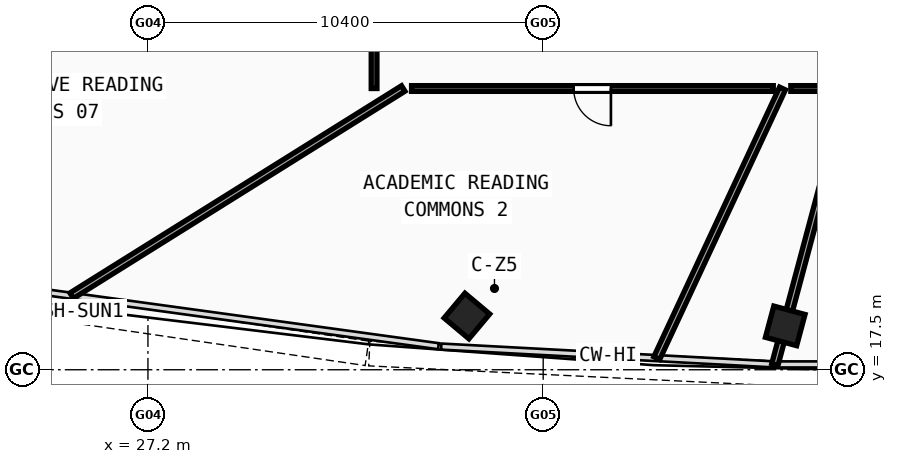
"""IFC4 building model, lengths in metres.
Left out: names, types, materials, properties, quantities, classifications, styles, units other than length and angle.
Written with IfcOpenShell. Run it as: python <this file> out.ifc"""

import sys

from ifc_helpers import new_model, si_unit, direction, frame, frame_2d, origin, origin_with_axes, origin_2d, place, context, subcontext, project, spatial, rectangle, hollow_rectangle, extrude, source, transform, mapped, element, fill, save


model = new_model("IFC4")
c1 = context("Model", 3, precision=1e-05, world=origin(), true_north=direction((0.0, 1.0)))
c2 = subcontext(c1, "Body", "Model", "MODEL_VIEW")
j1 = project(units=[si_unit("LENGTHUNIT", "METRE"), si_unit("PLANEANGLEUNIT", "RADIAN")], contexts=[c1])
p1 = place(None, origin())
s1 = spatial("IfcSite", under=j1, at=p1, CompositionType="ELEMENT")
p2 = place(p1, origin())
s2 = spatial("IfcBuilding", under=s1, at=p2, CompositionType="ELEMENT")
p3 = place(p2, frame((0.0, 0.0, 263.18)))
s3 = spatial("IfcBuildingStorey", under=s2, at=p3, CompositionType="ELEMENT", Elevation=263.18)
m1 = source(origin(), c2, "Body", "SweptSolid", [
    extrude(hollow_rectangle(XDim=0.85, YDim=0.85, WallThickness=0.034, at=origin_2d()), origin(), (0.0, 0.0, 1.0), 3.73),
])
for number, where, z_axis, x_axis in (
    (1, (35.593, 18.914, -0.26), (0.0, 0.0, 1.0), (0.766, -0.643, 0.0)),
    (2, (43.969, 18.654, -0.26), (0.0, 0.0, 1.0), (0.966, -0.259, 0.0)),
):
    element("IfcColumn", number, at=place(p3, frame(where, z_axis=z_axis, x_axis=x_axis)), inside=s3, PredefinedType="COLUMN", context=c2, shape_type="MappedRepresentation", body=[
        mapped(m1, transform((0.0, 0.0, 0.0), scale=1.0)),
    ])
p4 = place(p3, frame((33.917, 24.9, 0.0), z_axis=(0.0, 0.0, 1.0), x_axis=(-0.848046300914, -0.529922137211, 0.0)))
e3 = element("IfcWall", 3, at=p4, inside=s3, PredefinedType="PARTITIONING", context=c2, shape_type="SweptSolid", body=[
    extrude(rectangle(XDim=10.287, YDim=0.17, at=frame_2d((5.143, 0.0))), origin(), (0.0, 0.0, 1.0), 2.82),
])
p5 = place(p3, frame((43.896, 24.9, 0.0), z_axis=(0.0, 0.0, 1.0), x_axis=(-0.422631029952, -0.906301833012, 0.0)))
e4 = element("IfcWall", 4, at=p5, inside=s3, PredefinedType="PARTITIONING", context=c2, shape_type="SweptSolid", body=[
    extrude(rectangle(XDim=7.827, YDim=0.17, at=frame_2d((3.914, 0.0))), origin(), (0.0, 0.0, 1.0), 2.82),
])
p6 = place(p3, frame((45.642, 24.9, 0.0), z_axis=(0.0, 0.0, 1.0), x_axis=(-0.258810769147, -0.965928043787, 0.0)))
e5 = element("IfcWall", 5, at=p6, inside=s3, PredefinedType="PARTITIONING", context=c2, shape_type="SweptSolid", body=[
    extrude(rectangle(XDim=7.516, YDim=0.17, at=frame_2d((3.758, 0.0))), origin(), (0.0, 0.0, 1.0), 2.82),
])
p7 = place(p3, frame((33.15, 24.9, 0.0), z_axis=(0.0, 0.0, 1.0), x_axis=(0.0, 1.0, 0.0)))
e6 = element("IfcWall", 6, at=p7, inside=s3, PredefinedType="PARTITIONING", context=c2, shape_type="SweptSolid", body=[
    extrude(rectangle(XDim=5.958, YDim=0.15, at=frame_2d((2.979, 0.0))), origin(), (0.0, 0.0, 1.0), 3.12),
])
p8 = place(p7, frame((2.386, 0.0, 0.0)))
e7 = element("IfcOpeningElement", 7, at=p8, cuts=e6, PredefinedType="OPENING", context=c2, shape_type="SweptSolid", body=[
    extrude(rectangle(XDim=0.98, YDim=2.12, at=frame_2d((0.49, 1.06))), frame((0.0, 0.085, 0.0), z_axis=(0.0, -1.0, 0.0), x_axis=(1.0, 0.0, 0.0)), (0.0, 0.0, 1.0), 0.17),
])
p9 = place(p3, frame((45.414, 24.9, 0.0), z_axis=(0.0, 0.0, 1.0), x_axis=(-1.0, 0.0, 0.0)))
e8 = element("IfcWall", 8, at=p9, inside=s3, PredefinedType="PARTITIONING", context=c2, shape_type="SweptSolid", body=[
    extrude(rectangle(XDim=1.298, YDim=0.15, at=frame_2d((0.649, 0.0))), origin(), (0.0, 0.0, 1.0), 3.47),
])
p10 = place(p3, frame((43.654, 24.9, 0.0), z_axis=(0.0, 0.0, 1.0), x_axis=(-1.0, 0.0, 0.0)))
e9 = element("IfcWall", 9, at=p10, inside=s3, PredefinedType="PARTITIONING", context=c2, shape_type="SweptSolid", body=[
    extrude(rectangle(XDim=9.517, YDim=0.15, at=frame_2d((4.758, 0.0))), origin(), (0.0, 0.0, 1.0), 2.82),
])
p11 = place(p10, frame((4.272, 0.0, 0.0)))
e10 = element("IfcOpeningElement", 10, at=p11, cuts=e9, PredefinedType="OPENING", context=c2, shape_type="SweptSolid", body=[
    extrude(rectangle(XDim=0.98, YDim=2.12, at=frame_2d((0.49, 1.06))), frame((0.0, 0.085, 0.0), z_axis=(0.0, -1.0, 0.0), x_axis=(1.0, 0.0, 0.0)), (0.0, 0.0, 1.0), 0.17),
])
m2 = source(origin(), c2, "Body", "SweptSolid", [
    extrude(rectangle(XDim=0.98, YDim=2.12, at=frame_2d((0.49, 1.06))), frame((0.0, 0.025, 0.0), z_axis=(0.0, -1.0, 0.0), x_axis=(1.0, 0.0, 0.0)), (0.0, 0.0, 1.0), 0.05),
])
p12 = place(p11, origin_with_axes())
e11 = element("IfcDoor", 11, at=p12, inside=s3, OperationType="SINGLE_SWING_LEFT", PredefinedType="DOOR", context=c2, shape_type="MappedRepresentation", body=[
    mapped(m2, transform((0.0, 0.0, 0.0), scale=1.0)),
])
fill(e10, e11)
save(model, sys.argv[1])
